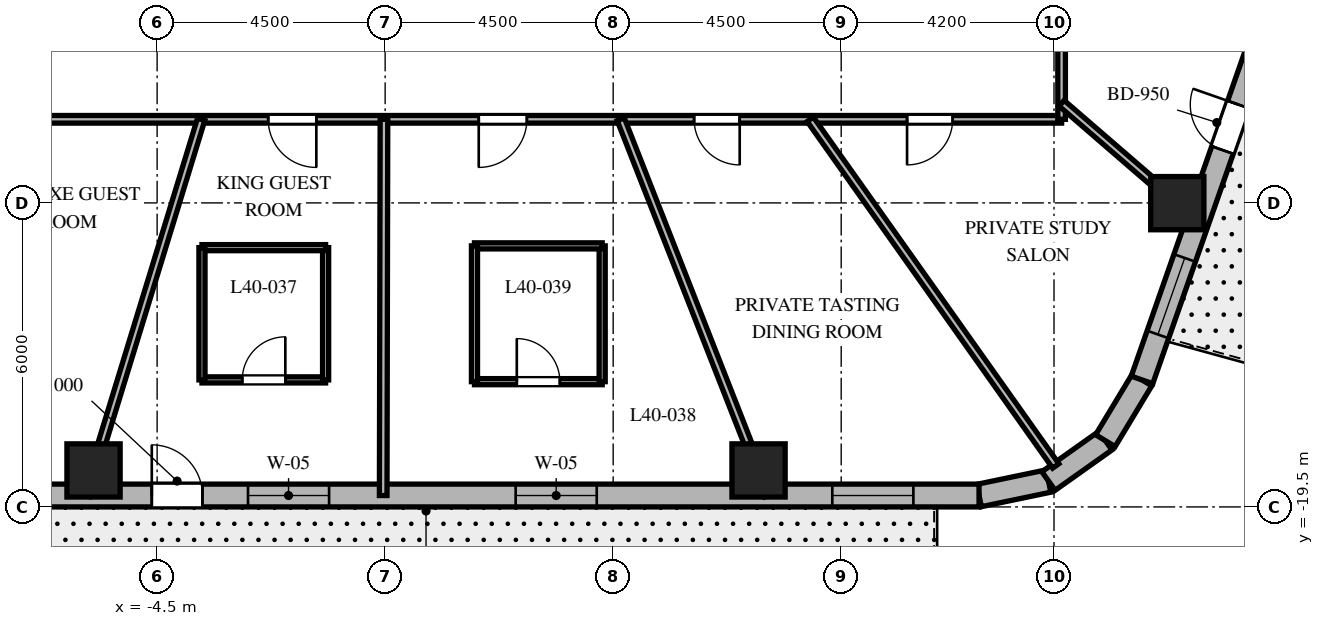
"""IFC4 building model, lengths in metres.
Left out: names, types, materials, properties, quantities, classifications, styles, units other than length and angle.
Written with IfcOpenShell. Run it as: python <this file> out.ifc"""

import sys

from ifc_helpers import new_model, si_unit, direction, frame, frame_2d, origin, origin_2d, place, context, subcontext, project, spatial, rectangle, extrude, element, fill, save


model = new_model("IFC4")
c1 = context("Model", 3, precision=1e-05, world=origin(), true_north=direction((0.0, 1.0)))
c2 = subcontext(c1, "Body", "Model", "MODEL_VIEW")
j1 = project(units=[si_unit("LENGTHUNIT", "METRE"), si_unit("PLANEANGLEUNIT", "RADIAN")], contexts=[c1])
p1 = place(None, origin())
s1 = spatial("IfcSite", under=j1, at=p1, CompositionType="ELEMENT")
p2 = place(p1, origin())
s2 = spatial("IfcBuilding", under=s1, at=p2, CompositionType="ELEMENT")
p3 = place(p2, frame((0.0, 0.0, 162.8)))
s3 = spatial("IfcBuildingStorey", under=s2, at=p3, CompositionType="ELEMENT", Elevation=162.8)
for number, where, z_axis, x_axis in (
    (1, (-5.755, -18.78, 0.0), (0.0, 0.0, 1.0), (1.0, 0.0, 0.0)),
    (2, (7.369, -18.78, 0.0), (0.0, 0.0, 1.0), (1.0, 0.0, 0.0)),
    (3, (15.633, -13.505, 0.0), (0.0, 0.0, 1.0), (1.0, 0.0, 0.0)),
):
    element("IfcColumn", number, at=place(p3, frame(where, z_axis=z_axis, x_axis=x_axis)), inside=s3, PredefinedType="COLUMN", context=c2, shape_type="SweptSolid", body=[
        extrude(rectangle(XDim=1.05, YDim=1.05, at=origin_2d()), origin(), (0.0, 0.0, 1.0), 3.7),
    ])
p4 = place(p3, frame((11.72, -19.275, 0.0), z_axis=(0.0, 0.0, 1.0), x_axis=(0.97893106758, 0.204191001093, 0.0)))
e4 = element("IfcWall", 4, at=p4, inside=s3, PredefinedType="SOLIDWALL", context=c2, shape_type="SweptSolid", body=[
    extrude(rectangle(XDim=1.4, YDim=0.45, at=frame_2d((0.7, 0.0))), origin(), (0.0, 0.0, 1.0), 3.4),
])
p5 = place(p3, frame((13.091, -18.989, 0.0), z_axis=(0.0, 0.0, 1.0), x_axis=(0.815574637848, 0.578651890258, 0.0)))
e5 = element("IfcWall", 5, at=p5, inside=s3, PredefinedType="SOLIDWALL", context=c2, shape_type="SweptSolid", body=[
    extrude(rectangle(XDim=1.377, YDim=0.45, at=frame_2d((0.688, 0.0))), origin(), (0.0, 0.0, 1.0), 3.4),
])
p6 = place(p3, frame((14.214, -18.192, 0.0), z_axis=(0.0, 0.0, 1.0), x_axis=(0.516340945502, 0.856383108193, 0.0)))
e6 = element("IfcWall", 6, at=p6, inside=s3, PredefinedType="SOLIDWALL", context=c2, shape_type="SweptSolid", body=[
    extrude(rectangle(XDim=1.4, YDim=0.45, at=frame_2d((0.7, 0.0))), origin(), (0.0, 0.0, 1.0), 3.4),
])
p7 = place(p3, frame((-10.108, -19.275, 0.0), z_axis=(0.0, 0.0, 1.0), x_axis=(1.0, 0.0, 0.0)))
e7 = element("IfcWall", 7, at=p7, inside=s3, PredefinedType="SOLIDWALL", context=c2, shape_type="SweptSolid", body=[
    extrude(rectangle(XDim=21.829, YDim=0.45, at=frame_2d((10.915, 0.0))), origin(), (0.0, 0.0, 1.0), 3.4),
])
p8 = place(p7, frame((5.503, 0.0, 0.0)))
e8 = element("IfcOpeningElement", 8, at=p8, cuts=e7, PredefinedType="OPENING", context=c2, shape_type="SweptSolid", body=[
    extrude(rectangle(XDim=1.0, YDim=2.15, at=frame_2d((0.5, 1.075))), frame((0.0, 0.235, 0.0), z_axis=(0.0, -1.0, 0.0), x_axis=(1.0, 0.0, 0.0)), (0.0, 0.0, 1.0), 0.47),
])
p9 = place(p7, frame((1.297, 0.0, 0.8)))
e9 = element("IfcOpeningElement", 9, at=p9, cuts=e7, PredefinedType="OPENING", context=c2, shape_type="SweptSolid", body=[
    extrude(rectangle(XDim=1.6, YDim=1.75, at=frame_2d((0.8, 0.875))), frame((0.0, 0.235, 0.0), z_axis=(0.0, -1.0, 0.0), x_axis=(1.0, 0.0, 0.0)), (0.0, 0.0, 1.0), 0.47),
])
p10 = place(p7, frame((7.402, 0.0, 0.8)))
e10 = element("IfcOpeningElement", 10, at=p10, cuts=e7, PredefinedType="OPENING", context=c2, shape_type="SweptSolid", body=[
    extrude(rectangle(XDim=1.6, YDim=1.75, at=frame_2d((0.8, 0.875))), frame((0.0, 0.235, 0.0), z_axis=(0.0, -1.0, 0.0), x_axis=(1.0, 0.0, 0.0)), (0.0, 0.0, 1.0), 0.47),
])
p11 = place(p7, frame((12.684, 0.0, 0.8)))
e11 = element("IfcOpeningElement", 11, at=p11, cuts=e7, PredefinedType="OPENING", context=c2, shape_type="SweptSolid", body=[
    extrude(rectangle(XDim=1.6, YDim=1.75, at=frame_2d((0.8, 0.875))), frame((0.0, 0.235, 0.0), z_axis=(0.0, -1.0, 0.0), x_axis=(1.0, 0.0, 0.0)), (0.0, 0.0, 1.0), 0.47),
])
p12 = place(p7, frame((18.933, 0.0, 0.8)))
e12 = element("IfcOpeningElement", 12, at=p12, cuts=e7, PredefinedType="OPENING", context=c2, shape_type="SweptSolid", body=[
    extrude(rectangle(XDim=1.6, YDim=1.75, at=frame_2d((0.8, 0.875))), frame((0.0, 0.235, 0.0), z_axis=(0.0, -1.0, 0.0), x_axis=(1.0, 0.0, 0.0)), (0.0, 0.0, 1.0), 0.47),
])
p13 = place(p3, frame((14.937, -16.993, 0.0), z_axis=(0.0, 0.0, 1.0), x_axis=(0.330431575061, 0.943829949834, 0.0)))
e13 = element("IfcWall", 13, at=p13, inside=s3, PredefinedType="SOLIDWALL", context=c2, shape_type="SweptSolid", body=[
    extrude(rectangle(XDim=17.689, YDim=0.45, at=frame_2d((8.844, 0.0))), origin(), (0.0, 0.0, 1.0), 3.4),
])
p14 = place(p13, frame((4.807, 0.0, 0.0)))
e14 = element("IfcOpeningElement", 14, at=p14, cuts=e13, PredefinedType="OPENING", context=c2, shape_type="SweptSolid", body=[
    extrude(rectangle(XDim=0.95, YDim=2.15, at=frame_2d((0.475, 1.075))), frame((0.0, 0.235, 0.0), z_axis=(0.0, -1.0, 0.0), x_axis=(1.0, 0.0, 0.0)), (0.0, 0.0, 1.0), 0.47),
])
p15 = place(p13, frame((0.95, 0.0, 0.8)))
e15 = element("IfcOpeningElement", 15, at=p15, cuts=e13, PredefinedType="OPENING", context=c2, shape_type="SweptSolid", body=[
    extrude(rectangle(XDim=1.6, YDim=1.75, at=frame_2d((0.8, 0.875))), frame((0.0, 0.235, 0.0), z_axis=(0.0, -1.0, 0.0), x_axis=(1.0, 0.0, 0.0)), (0.0, 0.0, 1.0), 0.47),
])
p16 = place(p13, frame((7.99, 0.0, 0.8)))
e16 = element("IfcOpeningElement", 16, at=p16, cuts=e13, PredefinedType="OPENING", context=c2, shape_type="SweptSolid", body=[
    extrude(rectangle(XDim=1.6, YDim=1.75, at=frame_2d((0.8, 0.875))), frame((0.0, 0.235, 0.0), z_axis=(0.0, -1.0, 0.0), x_axis=(1.0, 0.0, 0.0)), (0.0, 0.0, 1.0), 0.47),
])
p17 = place(p13, frame((15.084, 0.0, 0.8)))
e17 = element("IfcOpeningElement", 17, at=p17, cuts=e13, PredefinedType="OPENING", context=c2, shape_type="SweptSolid", body=[
    extrude(rectangle(XDim=1.6, YDim=1.75, at=frame_2d((0.8, 0.875))), frame((0.0, 0.235, 0.0), z_axis=(0.0, -1.0, 0.0), x_axis=(1.0, 0.0, 0.0)), (0.0, 0.0, 1.0), 0.47),
])
p18 = place(p3, frame((13.35, -11.85, 0.0), z_axis=(0.0, 0.0, 1.0), x_axis=(-1.0, 0.0, 0.0)))
e18 = element("IfcWall", 18, at=p18, inside=s3, PredefinedType="PARTITIONING", context=c2, shape_type="SweptSolid", body=[
    extrude(rectangle(XDim=26.7, YDim=0.15, at=frame_2d((13.35, 0.0))), origin(), (0.0, 0.0, 1.0), 2.84),
])
p19 = place(p18, frame((20.682, 0.0, 0.0)))
e19 = element("IfcOpeningElement", 19, at=p19, cuts=e18, PredefinedType="OPENING", context=c2, shape_type="SweptSolid", body=[
    extrude(rectangle(XDim=0.95, YDim=2.03, at=frame_2d((0.475, 1.015))), frame((0.0, 0.085, 0.0), z_axis=(0.0, -1.0, 0.0), x_axis=(1.0, 0.0, 0.0)), (0.0, 0.0, 1.0), 0.17),
])
p20 = place(p18, frame((14.708, 0.0, 0.0)))
e20 = element("IfcOpeningElement", 20, at=p20, cuts=e18, PredefinedType="OPENING", context=c2, shape_type="SweptSolid", body=[
    extrude(rectangle(XDim=0.95, YDim=2.03, at=frame_2d((0.475, 1.015))), frame((0.0, 0.085, 0.0), z_axis=(0.0, -1.0, 0.0), x_axis=(1.0, 0.0, 0.0)), (0.0, 0.0, 1.0), 0.17),
])
p21 = place(p18, frame((10.553, 0.0, 0.0)))
e21 = element("IfcOpeningElement", 21, at=p21, cuts=e18, PredefinedType="OPENING", context=c2, shape_type="SweptSolid", body=[
    extrude(rectangle(XDim=0.95, YDim=2.03, at=frame_2d((0.475, 1.015))), frame((0.0, 0.085, 0.0), z_axis=(0.0, -1.0, 0.0), x_axis=(1.0, 0.0, 0.0)), (0.0, 0.0, 1.0), 0.17),
])
p22 = place(p18, frame((6.353, 0.0, 0.0)))
e22 = element("IfcOpeningElement", 22, at=p22, cuts=e18, PredefinedType="OPENING", context=c2, shape_type="SweptSolid", body=[
    extrude(rectangle(XDim=0.9, YDim=2.03, at=frame_2d((0.45, 1.015))), frame((0.0, 0.085, 0.0), z_axis=(0.0, -1.0, 0.0), x_axis=(1.0, 0.0, 0.0)), (0.0, 0.0, 1.0), 0.17),
])
p23 = place(p18, frame((2.15, 0.0, 0.0)))
e23 = element("IfcOpeningElement", 23, at=p23, cuts=e18, PredefinedType="OPENING", context=c2, shape_type="SweptSolid", body=[
    extrude(rectangle(XDim=0.9, YDim=2.03, at=frame_2d((0.45, 1.015))), frame((0.0, 0.085, 0.0), z_axis=(0.0, -1.0, 0.0), x_axis=(1.0, 0.0, 0.0)), (0.0, 0.0, 1.0), 0.17),
])
p24 = place(p3, frame((13.35, 11.85, 0.0), z_axis=(0.0, 0.0, 1.0), x_axis=(0.0, -1.0, 0.0)))
e24 = element("IfcWall", 24, at=p24, inside=s3, PredefinedType="PARTITIONING", context=c2, shape_type="SweptSolid", body=[
    extrude(rectangle(XDim=23.7, YDim=0.15, at=frame_2d((11.85, 0.0))), origin(), (0.0, 0.0, 1.0), 2.84),
])
p25 = place(p24, frame((5.652, 0.0, 0.0)))
e25 = element("IfcOpeningElement", 25, at=p25, cuts=e24, PredefinedType="OPENING", context=c2, shape_type="SweptSolid", body=[
    extrude(rectangle(XDim=0.95, YDim=2.03, at=frame_2d((0.475, 1.015))), frame((0.0, 0.085, 0.0), z_axis=(0.0, -1.0, 0.0), x_axis=(1.0, 0.0, 0.0)), (0.0, 0.0, 1.0), 0.17),
])
p26 = place(p24, frame((1.721, 0.0, 0.0)))
e26 = element("IfcOpeningElement", 26, at=p26, cuts=e24, PredefinedType="OPENING", context=c2, shape_type="SweptSolid", body=[
    extrude(rectangle(XDim=0.9, YDim=2.03, at=frame_2d((0.45, 1.015))), frame((0.0, 0.085, 0.0), z_axis=(0.0, -1.0, 0.0), x_axis=(1.0, 0.0, 0.0)), (0.0, 0.0, 1.0), 0.17),
])
p27 = place(p24, frame((18.389, 0.0, 0.0)))
e27 = element("IfcOpeningElement", 27, at=p27, cuts=e24, PredefinedType="OPENING", context=c2, shape_type="SweptSolid", body=[
    extrude(rectangle(XDim=0.95, YDim=2.03, at=frame_2d((0.475, 1.015))), frame((0.0, 0.085, 0.0), z_axis=(0.0, -1.0, 0.0), x_axis=(1.0, 0.0, 0.0)), (0.0, 0.0, 1.0), 0.17),
])
p28 = place(p24, frame((10.751, 0.0, 0.0)))
e28 = element("IfcOpeningElement", 28, at=p28, cuts=e24, PredefinedType="OPENING", context=c2, shape_type="SweptSolid", body=[
    extrude(rectangle(XDim=0.95, YDim=2.03, at=frame_2d((0.475, 1.015))), frame((0.0, 0.085, 0.0), z_axis=(0.0, -1.0, 0.0), x_axis=(1.0, 0.0, 0.0)), (0.0, 0.0, 1.0), 0.17),
])
p29 = place(p3, frame((-3.631, -11.85, 0.0), z_axis=(0.0, 0.0, 1.0), x_axis=(-0.293007573338, -0.956110120209, 0.0)))
e29 = element("IfcWall", 29, at=p29, inside=s3, PredefinedType="PARTITIONING", context=c2, shape_type="SweptSolid", body=[
    extrude(rectangle(XDim=7.766, YDim=0.15, at=frame_2d((3.883, 0.0))), origin(), (0.0, 0.0, 1.0), 2.64),
])
p30 = place(p3, frame((-0.024, -11.85, 0.0), z_axis=(0.0, 0.0, 1.0), x_axis=(-0.001972901592, -0.999998053828, 0.0)))
e30 = element("IfcWall", 30, at=p30, inside=s3, PredefinedType="PARTITIONING", context=c2, shape_type="SweptSolid", body=[
    extrude(rectangle(XDim=7.425, YDim=0.15, at=frame_2d((3.712, 0.0))), origin(), (0.0, 0.0, 1.0), 2.64),
])
p31 = place(p3, frame((4.65, -11.85, 0.0), z_axis=(0.0, 0.0, 1.0), x_axis=(0.365265947993, -0.930903210456, 0.0)))
e31 = element("IfcWall", 31, at=p31, inside=s3, PredefinedType="PARTITIONING", context=c2, shape_type="SweptSolid", body=[
    extrude(rectangle(XDim=7.976, YDim=0.15, at=frame_2d((3.988, 0.0))), origin(), (0.0, 0.0, 1.0), 2.64),
])
p32 = place(p3, frame((8.39, -11.85, 0.0), z_axis=(0.0, 0.0, 1.0), x_axis=(0.577877530264, -0.816123495566, 0.0)))
e32 = element("IfcWall", 32, at=p32, inside=s3, PredefinedType="PARTITIONING", context=c2, shape_type="SweptSolid", body=[
    extrude(rectangle(XDim=8.382, YDim=0.15, at=frame_2d((4.191, 0.0))), origin(), (0.0, 0.0, 1.0), 2.64),
])
p33 = place(p3, frame((13.35, -11.533, 0.0), z_axis=(0.0, 0.0, 1.0), x_axis=(0.756711647314, -0.65374879183, 0.0)))
e33 = element("IfcWall", 33, at=p33, inside=s3, PredefinedType="PARTITIONING", context=c2, shape_type="SweptSolid", body=[
    extrude(rectangle(XDim=3.55, YDim=0.15, at=frame_2d((1.775, 0.0))), origin(), (0.0, 0.0, 1.0), 2.64),
])
p34 = place(p3, frame((-3.615, -16.993, 0.0), z_axis=(0.0, 0.0, 1.0), x_axis=(1.0, 0.0, 0.0)))
e34 = element("IfcWall", 34, at=p34, inside=s3, PredefinedType="PARTITIONING", context=c2, shape_type="SweptSolid", body=[
    extrude(rectangle(XDim=2.44, YDim=0.12, at=frame_2d((1.22, 0.0))), origin(), (0.0, 0.0, 1.0), 3.4),
])
p35 = place(p34, frame((0.795, 0.0, 0.0)))
e35 = element("IfcOpeningElement", 35, at=p35, cuts=e34, PredefinedType="OPENING", context=c2, shape_type="SweptSolid", body=[
    extrude(rectangle(XDim=0.85, YDim=2.03, at=frame_2d((0.425, 1.015))), frame((0.0, 0.07, 0.0), z_axis=(0.0, -1.0, 0.0), x_axis=(1.0, 0.0, 0.0)), (0.0, 0.0, 1.0), 0.14),
])
p36 = place(p3, frame((-1.175, -16.993, 0.0), z_axis=(0.0, 0.0, 1.0), x_axis=(0.0, 1.0, 0.0)))
e36 = element("IfcWall", 36, at=p36, inside=s3, PredefinedType="PARTITIONING", context=c2, shape_type="SweptSolid", body=[
    extrude(rectangle(XDim=2.61, YDim=0.12, at=frame_2d((1.305, 0.0))), origin(), (0.0, 0.0, 1.0), 2.84),
])
p37 = place(p3, frame((-1.175, -14.383, 0.0), z_axis=(0.0, 0.0, 1.0), x_axis=(-1.0, 0.0, 0.0)))
e37 = element("IfcWall", 37, at=p37, inside=s3, PredefinedType="PARTITIONING", context=c2, shape_type="SweptSolid", body=[
    extrude(rectangle(XDim=2.44, YDim=0.12, at=frame_2d((1.22, 0.0))), origin(), (0.0, 0.0, 1.0), 3.4),
])
p38 = place(p3, frame((-3.615, -14.383, 0.0), z_axis=(0.0, 0.0, 1.0), x_axis=(0.0, -1.0, 0.0)))
e38 = element("IfcWall", 38, at=p38, inside=s3, PredefinedType="PARTITIONING", context=c2, shape_type="SweptSolid", body=[
    extrude(rectangle(XDim=2.61, YDim=0.12, at=frame_2d((1.305, 0.0))), origin(), (0.0, 0.0, 1.0), 2.84),
])
p39 = place(p3, frame((1.763, -17.028, 0.0), z_axis=(0.0, 0.0, 1.0), x_axis=(1.0, 0.0, 0.0)))
e39 = element("IfcWall", 39, at=p39, inside=s3, PredefinedType="PARTITIONING", context=c2, shape_type="SweptSolid", body=[
    extrude(rectangle(XDim=2.52, YDim=0.12, at=frame_2d((1.26, 0.0))), origin(), (0.0, 0.0, 1.0), 3.4),
])
p40 = place(p39, frame((0.835, 0.0, 0.0)))
e40 = element("IfcOpeningElement", 40, at=p40, cuts=e39, PredefinedType="OPENING", context=c2, shape_type="SweptSolid", body=[
    extrude(rectangle(XDim=0.85, YDim=2.03, at=frame_2d((0.425, 1.015))), frame((0.0, 0.07, 0.0), z_axis=(0.0, -1.0, 0.0), x_axis=(1.0, 0.0, 0.0)), (0.0, 0.0, 1.0), 0.14),
])
p41 = place(p3, frame((4.283, -17.028, 0.0), z_axis=(0.0, 0.0, 1.0), x_axis=(0.0, 1.0, 0.0)))
e41 = element("IfcWall", 41, at=p41, inside=s3, PredefinedType="PARTITIONING", context=c2, shape_type="SweptSolid", body=[
    extrude(rectangle(XDim=2.68, YDim=0.12, at=frame_2d((1.34, 0.0))), origin(), (0.0, 0.0, 1.0), 2.84),
])
p42 = place(p3, frame((4.283, -14.348, 0.0), z_axis=(0.0, 0.0, 1.0), x_axis=(-1.0, 0.0, 0.0)))
e42 = element("IfcWall", 42, at=p42, inside=s3, PredefinedType="PARTITIONING", context=c2, shape_type="SweptSolid", body=[
    extrude(rectangle(XDim=2.52, YDim=0.12, at=frame_2d((1.26, 0.0))), origin(), (0.0, 0.0, 1.0), 3.4),
])
p43 = place(p3, frame((1.763, -14.348, 0.0), z_axis=(0.0, 0.0, 1.0), x_axis=(0.0, -1.0, 0.0)))
e43 = element("IfcWall", 43, at=p43, inside=s3, PredefinedType="PARTITIONING", context=c2, shape_type="SweptSolid", body=[
    extrude(rectangle(XDim=2.68, YDim=0.12, at=frame_2d((1.34, 0.0))), origin(), (0.0, 0.0, 1.0), 2.84),
])
p44 = place(p8, origin())
e44 = element("IfcDoor", 44, at=p44, inside=s3, OperationType="SINGLE_SWING_LEFT", PredefinedType="DOOR", context=c2, shape_type="SweptSolid", body=[
    extrude(rectangle(XDim=1.0, YDim=2.15, at=frame_2d((0.5, 1.075))), frame((0.0, 0.025, 0.0), z_axis=(0.0, -1.0, 0.0), x_axis=(1.0, 0.0, 0.0)), (0.0, 0.0, 1.0), 0.05),
])
fill(e8, e44)
p45 = place(p10, origin())
e45 = element("IfcWindow", 45, at=p45, inside=s3, PartitioningType="SINGLE_PANEL", PredefinedType="WINDOW", context=c2, shape_type="SweptSolid", body=[
    extrude(rectangle(XDim=1.6, YDim=1.75, at=frame_2d((0.8, 0.875))), frame((0.0, 0.03, 0.0), z_axis=(0.0, -1.0, 0.0), x_axis=(1.0, 0.0, 0.0)), (0.0, 0.0, 1.0), 0.06),
])
fill(e10, e45)
p46 = place(p11, origin())
e46 = element("IfcWindow", 46, at=p46, inside=s3, PartitioningType="SINGLE_PANEL", PredefinedType="WINDOW", context=c2, shape_type="SweptSolid", body=[
    extrude(rectangle(XDim=1.6, YDim=1.75, at=frame_2d((0.8, 0.875))), frame((0.0, 0.03, 0.0), z_axis=(0.0, -1.0, 0.0), x_axis=(1.0, 0.0, 0.0)), (0.0, 0.0, 1.0), 0.06),
])
fill(e11, e46)
p47 = place(p12, origin())
e47 = element("IfcWindow", 47, at=p47, inside=s3, PartitioningType="SINGLE_PANEL", PredefinedType="WINDOW", context=c2, shape_type="SweptSolid", body=[
    extrude(rectangle(XDim=1.6, YDim=1.75, at=frame_2d((0.8, 0.875))), frame((0.0, 0.03, 0.0), z_axis=(0.0, -1.0, 0.0), x_axis=(1.0, 0.0, 0.0)), (0.0, 0.0, 1.0), 0.06),
])
fill(e12, e47)
p48 = place(p14, origin())
e48 = element("IfcDoor", 48, at=p48, inside=s3, OperationType="SINGLE_SWING_RIGHT", PredefinedType="DOOR", context=c2, shape_type="SweptSolid", body=[
    extrude(rectangle(XDim=0.95, YDim=2.15, at=frame_2d((0.475, 1.075))), frame((0.0, 0.025, 0.0), z_axis=(0.0, -1.0, 0.0), x_axis=(1.0, 0.0, 0.0)), (0.0, 0.0, 1.0), 0.05),
])
fill(e14, e48)
p49 = place(p15, origin())
e49 = element("IfcWindow", 49, at=p49, inside=s3, PartitioningType="SINGLE_PANEL", PredefinedType="WINDOW", context=c2, shape_type="SweptSolid", body=[
    extrude(rectangle(XDim=1.6, YDim=1.75, at=frame_2d((0.8, 0.875))), frame((0.0, 0.03, 0.0), z_axis=(0.0, -1.0, 0.0), x_axis=(1.0, 0.0, 0.0)), (0.0, 0.0, 1.0), 0.06),
])
fill(e15, e49)
p50 = place(p20, origin())
e50 = element("IfcDoor", 50, at=p50, inside=s3, OperationType="SINGLE_SWING_LEFT", PredefinedType="DOOR", context=c2, shape_type="SweptSolid", body=[
    extrude(rectangle(XDim=0.95, YDim=2.03, at=frame_2d((0.475, 1.015))), frame((0.0, 0.025, 0.0), z_axis=(0.0, -1.0, 0.0), x_axis=(1.0, 0.0, 0.0)), (0.0, 0.0, 1.0), 0.05),
])
fill(e20, e50)
p51 = place(p35, origin())
e51 = element("IfcDoor", 51, at=p51, inside=s3, OperationType="SINGLE_SWING_RIGHT", PredefinedType="DOOR", context=c2, shape_type="SweptSolid", body=[
    extrude(rectangle(XDim=0.85, YDim=2.03, at=frame_2d((0.425, 1.015))), frame((0.0, 0.025, 0.0), z_axis=(0.0, -1.0, 0.0), x_axis=(1.0, 0.0, 0.0)), (0.0, 0.0, 1.0), 0.05),
])
fill(e35, e51)
p52 = place(p21, origin())
e52 = element("IfcDoor", 52, at=p52, inside=s3, OperationType="SINGLE_SWING_RIGHT", PredefinedType="DOOR", context=c2, shape_type="SweptSolid", body=[
    extrude(rectangle(XDim=0.95, YDim=2.03, at=frame_2d((0.475, 1.015))), frame((0.0, 0.025, 0.0), z_axis=(0.0, -1.0, 0.0), x_axis=(1.0, 0.0, 0.0)), (0.0, 0.0, 1.0), 0.05),
])
fill(e21, e52)
p53 = place(p40, origin())
e53 = element("IfcDoor", 53, at=p53, inside=s3, OperationType="SINGLE_SWING_LEFT", PredefinedType="DOOR", context=c2, shape_type="SweptSolid", body=[
    extrude(rectangle(XDim=0.85, YDim=2.03, at=frame_2d((0.425, 1.015))), frame((0.0, 0.025, 0.0), z_axis=(0.0, -1.0, 0.0), x_axis=(1.0, 0.0, 0.0)), (0.0, 0.0, 1.0), 0.05),
])
fill(e40, e53)
p54 = place(p22, origin())
e54 = element("IfcDoor", 54, at=p54, inside=s3, OperationType="SINGLE_SWING_LEFT", PredefinedType="DOOR", context=c2, shape_type="SweptSolid", body=[
    extrude(rectangle(XDim=0.9, YDim=2.03, at=frame_2d((0.45, 1.015))), frame((0.0, 0.025, 0.0), z_axis=(0.0, -1.0, 0.0), x_axis=(1.0, 0.0, 0.0)), (0.0, 0.0, 1.0), 0.05),
])
fill(e22, e54)
p55 = place(p23, origin())
e55 = element("IfcDoor", 55, at=p55, inside=s3, OperationType="SINGLE_SWING_RIGHT", PredefinedType="DOOR", context=c2, shape_type="SweptSolid", body=[
    extrude(rectangle(XDim=0.9, YDim=2.03, at=frame_2d((0.45, 1.015))), frame((0.0, 0.025, 0.0), z_axis=(0.0, -1.0, 0.0), x_axis=(1.0, 0.0, 0.0)), (0.0, 0.0, 1.0), 0.05),
])
fill(e23, e55)
save(model, sys.argv[1])
